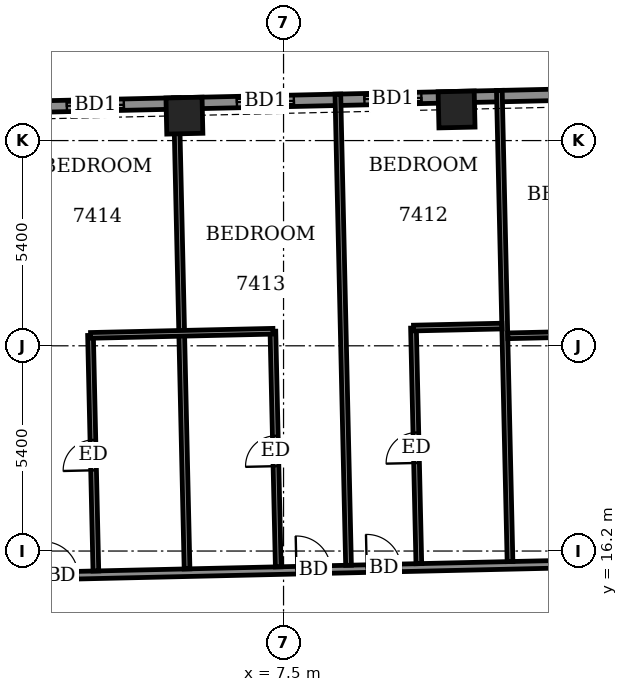
"""IFC4 building model, lengths in metres.
Left out: names, types, materials, properties, quantities, classifications, styles, units other than length and angle.
Written with IfcOpenShell. Run it as: python <this file> out.ifc"""

import sys

from ifc_helpers import new_model, si_unit, direction, frame, frame_2d, origin, origin_2d, place, context, subcontext, project, spatial, rectangle, extrude, element, fill, save


model = new_model("IFC4")
c1 = context("Model", 3, precision=1e-05, world=origin(), true_north=direction((0.0, 1.0)))
c2 = subcontext(c1, "Body", "Model", "MODEL_VIEW")
j1 = project(units=[si_unit("LENGTHUNIT", "METRE"), si_unit("PLANEANGLEUNIT", "RADIAN")], contexts=[c1])
p1 = place(None, origin())
s1 = spatial("IfcSite", under=j1, at=p1, CompositionType="ELEMENT")
p2 = place(p1, origin())
s2 = spatial("IfcBuilding", under=s1, at=p2, CompositionType="ELEMENT")
p3 = place(p2, frame((0.0, 0.0, 290.7)))
s3 = spatial("IfcBuildingStorey", under=s2, at=p3, CompositionType="ELEMENT", Elevation=290.7)
for number, where, z_axis, x_axis in (
    (1, (12.053, 27.819, -0.55), (0.0, 0.0, 1.0), (-1.0, -0.023, 0.0)),
    (2, (4.892, 27.656, -0.55), (0.0, 0.0, 1.0), (-1.0, -0.023, 0.0)),
):
    element("IfcColumn", number, at=place(p3, frame(where, z_axis=z_axis, x_axis=x_axis)), inside=s3, PredefinedType="COLUMN", context=c2, shape_type="SweptSolid", body=[
        extrude(rectangle(XDim=0.95, YDim=0.95, at=origin_2d()), origin(), (0.0, 0.0, 1.0), 3.6),
    ])
p4 = place(p3, frame((26.216, 28.465, 0.0), z_axis=(0.0, 0.0, 1.0), x_axis=(-0.999742843677, -0.022677004157, 0.0)))
e3 = element("IfcWall", 3, at=p4, inside=s3, PredefinedType="SOLIDWALL", context=c2, shape_type="SweptSolid", body=[
    extrude(rectangle(XDim=49.836, YDim=0.3, at=frame_2d((24.918, 0.0))), origin(), (0.0, 0.0, 1.0), 2.5),
])
p5 = place(p4, frame((1.763, 0.0, 0.0)))
e4 = element("IfcOpeningElement", 4, at=p5, cuts=e3, PredefinedType="OPENING", context=c2, shape_type="SweptSolid", body=[
    extrude(rectangle(XDim=1.5, YDim=2.4, at=frame_2d((0.75, 1.2))), frame((0.0, 0.16, 0.0), z_axis=(0.0, -1.0, 0.0), x_axis=(1.0, 0.0, 0.0)), (0.0, 0.0, 1.0), 0.32),
])
p6 = place(p4, frame((4.912, 0.0, 0.0)))
e5 = element("IfcOpeningElement", 5, at=p6, cuts=e3, PredefinedType="OPENING", context=c2, shape_type="SweptSolid", body=[
    extrude(rectangle(XDim=1.5, YDim=2.4, at=frame_2d((0.75, 1.2))), frame((0.0, 0.16, 0.0), z_axis=(0.0, -1.0, 0.0), x_axis=(1.0, 0.0, 0.0)), (0.0, 0.0, 1.0), 0.32),
])
p7 = place(p4, frame((10.186, 0.0, 0.0)))
e6 = element("IfcOpeningElement", 6, at=p7, cuts=e3, PredefinedType="OPENING", context=c2, shape_type="SweptSolid", body=[
    extrude(rectangle(XDim=1.5, YDim=2.4, at=frame_2d((0.75, 1.2))), frame((0.0, 0.16, 0.0), z_axis=(0.0, -1.0, 0.0), x_axis=(1.0, 0.0, 0.0)), (0.0, 0.0, 1.0), 0.32),
])
p8 = place(p4, frame((15.093, 0.0, 0.0)))
e7 = element("IfcOpeningElement", 7, at=p8, cuts=e3, PredefinedType="OPENING", context=c2, shape_type="SweptSolid", body=[
    extrude(rectangle(XDim=1.5, YDim=2.4, at=frame_2d((0.75, 1.2))), frame((0.0, 0.16, 0.0), z_axis=(0.0, -1.0, 0.0), x_axis=(1.0, 0.0, 0.0)), (0.0, 0.0, 1.0), 0.32),
])
p9 = place(p4, frame((18.449, 0.0, 0.0)))
e8 = element("IfcOpeningElement", 8, at=p9, cuts=e3, PredefinedType="OPENING", context=c2, shape_type="SweptSolid", body=[
    extrude(rectangle(XDim=1.5, YDim=2.4, at=frame_2d((0.75, 1.2))), frame((0.0, 0.16, 0.0), z_axis=(0.0, -1.0, 0.0), x_axis=(1.0, 0.0, 0.0)), (0.0, 0.0, 1.0), 0.32),
])
p10 = place(p4, frame((22.924, 0.0, 0.0)))
e9 = element("IfcOpeningElement", 9, at=p10, cuts=e3, PredefinedType="OPENING", context=c2, shape_type="SweptSolid", body=[
    extrude(rectangle(XDim=1.5, YDim=2.4, at=frame_2d((0.75, 1.2))), frame((0.0, 0.16, 0.0), z_axis=(0.0, -1.0, 0.0), x_axis=(1.0, 0.0, 0.0)), (0.0, 0.0, 1.0), 0.32),
])
p11 = place(p4, frame((26.28, 0.0, 0.0)))
e10 = element("IfcOpeningElement", 10, at=p11, cuts=e3, PredefinedType="OPENING", context=c2, shape_type="SweptSolid", body=[
    extrude(rectangle(XDim=1.5, YDim=2.4, at=frame_2d((0.75, 1.2))), frame((0.0, 0.16, 0.0), z_axis=(0.0, -1.0, 0.0), x_axis=(1.0, 0.0, 0.0)), (0.0, 0.0, 1.0), 0.32),
])
p12 = place(p4, frame((31.361, 0.0, 0.0)))
e11 = element("IfcOpeningElement", 11, at=p12, cuts=e3, PredefinedType="OPENING", context=c2, shape_type="SweptSolid", body=[
    extrude(rectangle(XDim=1.5, YDim=2.4, at=frame_2d((0.75, 1.2))), frame((0.0, 0.16, 0.0), z_axis=(0.0, -1.0, 0.0), x_axis=(1.0, 0.0, 0.0)), (0.0, 0.0, 1.0), 0.32),
])
p13 = place(p4, frame((36.437, 0.0, 0.0)))
e12 = element("IfcOpeningElement", 12, at=p13, cuts=e3, PredefinedType="OPENING", context=c2, shape_type="SweptSolid", body=[
    extrude(rectangle(XDim=1.5, YDim=2.4, at=frame_2d((0.75, 1.2))), frame((0.0, 0.16, 0.0), z_axis=(0.0, -1.0, 0.0), x_axis=(1.0, 0.0, 0.0)), (0.0, 0.0, 1.0), 0.32),
])
p14 = place(p4, frame((39.793, 0.0, 0.0)))
e13 = element("IfcOpeningElement", 13, at=p14, cuts=e3, PredefinedType="OPENING", context=c2, shape_type="SweptSolid", body=[
    extrude(rectangle(XDim=1.5, YDim=2.4, at=frame_2d((0.75, 1.2))), frame((0.0, 0.16, 0.0), z_axis=(0.0, -1.0, 0.0), x_axis=(1.0, 0.0, 0.0)), (0.0, 0.0, 1.0), 0.32),
])
p15 = place(p4, frame((44.267, 0.0, 0.0)))
e14 = element("IfcOpeningElement", 14, at=p15, cuts=e3, PredefinedType="OPENING", context=c2, shape_type="SweptSolid", body=[
    extrude(rectangle(XDim=1.5, YDim=2.4, at=frame_2d((0.75, 1.2))), frame((0.0, 0.16, 0.0), z_axis=(0.0, -1.0, 0.0), x_axis=(1.0, 0.0, 0.0)), (0.0, 0.0, 1.0), 0.32),
])
p16 = place(p4, frame((47.524, 0.0, 0.9)))
e15 = element("IfcOpeningElement", 15, at=p16, cuts=e3, PredefinedType="OPENING", context=c2, shape_type="SweptSolid", body=[
    extrude(rectangle(XDim=1.2, YDim=1.5, at=frame_2d((0.6, 0.75))), frame((0.0, 0.16, 0.0), z_axis=(0.0, -1.0, 0.0), x_axis=(1.0, 0.0, 0.0)), (0.0, 0.0, 1.0), 0.32),
])
p17 = place(p3, frame((-26.401, 14.918, 0.0), z_axis=(0.0, 0.0, 1.0), x_axis=(0.99974239733, 0.022696673341, 0.0)))
e16 = element("IfcWall", 16, at=p17, inside=s3, PredefinedType="PARTITIONING", context=c2, shape_type="SweptSolid", body=[
    extrude(rectangle(XDim=55.386, YDim=0.2, at=frame_2d((27.693, 0.0))), origin(), (0.0, 0.0, 1.0), 3.05),
])
p18 = place(p17, frame((53.718, 0.0, 0.0)))
e17 = element("IfcOpeningElement", 17, at=p18, cuts=e16, PredefinedType="OPENING", context=c2, shape_type="SweptSolid", body=[
    extrude(rectangle(XDim=1.0, YDim=2.1, at=frame_2d((0.5, 1.05))), frame((0.0, 0.11, 0.0), z_axis=(0.0, -1.0, 0.0), x_axis=(1.0, 0.0, 0.0)), (0.0, 0.0, 1.0), 0.22),
])
p19 = place(p17, frame((49.325, 0.0, 0.0)))
e18 = element("IfcOpeningElement", 18, at=p19, cuts=e16, PredefinedType="OPENING", context=c2, shape_type="SweptSolid", body=[
    extrude(rectangle(XDim=0.9, YDim=2.1, at=frame_2d((0.45, 1.05))), frame((0.0, 0.11, 0.0), z_axis=(0.0, -1.0, 0.0), x_axis=(1.0, 0.0, 0.0)), (0.0, 0.0, 1.0), 0.22),
])
p20 = place(p17, frame((44.575, 0.0, 0.0)))
e19 = element("IfcOpeningElement", 19, at=p20, cuts=e16, PredefinedType="OPENING", context=c2, shape_type="SweptSolid", body=[
    extrude(rectangle(XDim=0.9, YDim=2.1, at=frame_2d((0.45, 1.05))), frame((0.0, 0.11, 0.0), z_axis=(0.0, -1.0, 0.0), x_axis=(1.0, 0.0, 0.0)), (0.0, 0.0, 1.0), 0.22),
])
p21 = place(p17, frame((42.725, 0.0, 0.0)))
e20 = element("IfcOpeningElement", 20, at=p21, cuts=e16, PredefinedType="OPENING", context=c2, shape_type="SweptSolid", body=[
    extrude(rectangle(XDim=0.9, YDim=2.1, at=frame_2d((0.45, 1.05))), frame((0.0, 0.11, 0.0), z_axis=(0.0, -1.0, 0.0), x_axis=(1.0, 0.0, 0.0)), (0.0, 0.0, 1.0), 0.22),
])
p22 = place(p17, frame((36.1, 0.0, 0.0)))
e21 = element("IfcOpeningElement", 21, at=p22, cuts=e16, PredefinedType="OPENING", context=c2, shape_type="SweptSolid", body=[
    extrude(rectangle(XDim=0.9, YDim=2.1, at=frame_2d((0.45, 1.05))), frame((0.0, 0.11, 0.0), z_axis=(0.0, -1.0, 0.0), x_axis=(1.0, 0.0, 0.0)), (0.0, 0.0, 1.0), 0.22),
])
p23 = place(p17, frame((34.25, 0.0, 0.0)))
e22 = element("IfcOpeningElement", 22, at=p23, cuts=e16, PredefinedType="OPENING", context=c2, shape_type="SweptSolid", body=[
    extrude(rectangle(XDim=0.9, YDim=2.1, at=frame_2d((0.45, 1.05))), frame((0.0, 0.11, 0.0), z_axis=(0.0, -1.0, 0.0), x_axis=(1.0, 0.0, 0.0)), (0.0, 0.0, 1.0), 0.22),
])
p24 = place(p17, frame((27.6, 0.0, 0.0)))
e23 = element("IfcOpeningElement", 23, at=p24, cuts=e16, PredefinedType="OPENING", context=c2, shape_type="SweptSolid", body=[
    extrude(rectangle(XDim=0.9, YDim=2.1, at=frame_2d((0.45, 1.05))), frame((0.0, 0.11, 0.0), z_axis=(0.0, -1.0, 0.0), x_axis=(1.0, 0.0, 0.0)), (0.0, 0.0, 1.0), 0.22),
])
p25 = place(p17, frame((25.775, 0.0, 0.0)))
e24 = element("IfcOpeningElement", 24, at=p25, cuts=e16, PredefinedType="OPENING", context=c2, shape_type="SweptSolid", body=[
    extrude(rectangle(XDim=0.9, YDim=2.1, at=frame_2d((0.45, 1.05))), frame((0.0, 0.11, 0.0), z_axis=(0.0, -1.0, 0.0), x_axis=(1.0, 0.0, 0.0)), (0.0, 0.0, 1.0), 0.22),
])
p26 = place(p17, frame((19.15, 0.0, 0.0)))
e25 = element("IfcOpeningElement", 25, at=p26, cuts=e16, PredefinedType="OPENING", context=c2, shape_type="SweptSolid", body=[
    extrude(rectangle(XDim=0.9, YDim=2.1, at=frame_2d((0.45, 1.05))), frame((0.0, 0.11, 0.0), z_axis=(0.0, -1.0, 0.0), x_axis=(1.0, 0.0, 0.0)), (0.0, 0.0, 1.0), 0.22),
])
p27 = place(p17, frame((17.3, 0.0, 0.0)))
e26 = element("IfcOpeningElement", 26, at=p27, cuts=e16, PredefinedType="OPENING", context=c2, shape_type="SweptSolid", body=[
    extrude(rectangle(XDim=0.9, YDim=2.1, at=frame_2d((0.45, 1.05))), frame((0.0, 0.11, 0.0), z_axis=(0.0, -1.0, 0.0), x_axis=(1.0, 0.0, 0.0)), (0.0, 0.0, 1.0), 0.22),
])
p28 = place(p17, frame((10.65, 0.0, 0.0)))
e27 = element("IfcOpeningElement", 27, at=p28, cuts=e16, PredefinedType="OPENING", context=c2, shape_type="SweptSolid", body=[
    extrude(rectangle(XDim=0.9, YDim=2.1, at=frame_2d((0.45, 1.05))), frame((0.0, 0.11, 0.0), z_axis=(0.0, -1.0, 0.0), x_axis=(1.0, 0.0, 0.0)), (0.0, 0.0, 1.0), 0.22),
])
p29 = place(p17, frame((8.8, 0.0, 0.0)))
e28 = element("IfcOpeningElement", 28, at=p29, cuts=e16, PredefinedType="OPENING", context=c2, shape_type="SweptSolid", body=[
    extrude(rectangle(XDim=0.9, YDim=2.1, at=frame_2d((0.45, 1.05))), frame((0.0, 0.11, 0.0), z_axis=(0.0, -1.0, 0.0), x_axis=(1.0, 0.0, 0.0)), (0.0, 0.0, 1.0), 0.22),
])
p30 = place(p17, frame((1.864, 0.0, 0.0)))
e29 = element("IfcOpeningElement", 29, at=p30, cuts=e16, PredefinedType="OPENING", context=c2, shape_type="SweptSolid", body=[
    extrude(rectangle(XDim=1.0, YDim=2.1, at=frame_2d((0.5, 1.05))), frame((0.0, 0.11, 0.0), z_axis=(0.0, -1.0, 0.0), x_axis=(1.0, 0.0, 0.0)), (0.0, 0.0, 1.0), 0.22),
])
p31 = place(p3, frame((2.562, 15.675, 0.0), z_axis=(0.0, 0.0, 1.0), x_axis=(-0.02275807565, 0.999741001456, 0.0)))
e30 = element("IfcWall", 30, at=p31, inside=s3, PredefinedType="PARTITIONING", context=c2, shape_type="SweptSolid", body=[
    extrude(rectangle(XDim=6.201, YDim=0.15, at=frame_2d((3.1, 0.0))), origin(), (0.0, 0.0, 1.0), 3.05),
])
p32 = place(p31, frame((2.65, 0.0, 0.0)))
e31 = element("IfcOpeningElement", 31, at=p32, cuts=e30, PredefinedType="OPENING", context=c2, shape_type="SweptSolid", body=[
    extrude(rectangle(XDim=0.8, YDim=2.1, at=frame_2d((0.4, 1.05))), frame((0.0, 0.085, 0.0), z_axis=(0.0, -1.0, 0.0), x_axis=(1.0, 0.0, 0.0)), (0.0, 0.0, 1.0), 0.17),
])
p33 = place(p3, frame((4.961, 15.73, 0.0), z_axis=(0.0, 0.0, 1.0), x_axis=(-0.022661475803, 0.999743195783, 0.0)))
e32 = element("IfcWall", 32, at=p33, inside=s3, PredefinedType="PARTITIONING", context=c2, shape_type="SweptSolid", body=[
    extrude(rectangle(XDim=12.4, YDim=0.15, at=frame_2d((6.2, 0.0))), origin(), (0.0, 0.0, 1.0), 3.05),
])
p34 = place(p3, frame((7.361, 15.784, 0.0), z_axis=(0.0, 0.0, 1.0), x_axis=(-0.02275807565, 0.999741001456, 0.0)))
e33 = element("IfcWall", 33, at=p34, inside=s3, PredefinedType="PARTITIONING", context=c2, shape_type="SweptSolid", body=[
    extrude(rectangle(XDim=6.201, YDim=0.15, at=frame_2d((3.1, 0.0))), origin(), (0.0, 0.0, 1.0), 3.05),
])
p35 = place(p34, frame((2.65, 0.0, 0.0)))
e34 = element("IfcOpeningElement", 34, at=p35, cuts=e33, PredefinedType="OPENING", context=c2, shape_type="SweptSolid", body=[
    extrude(rectangle(XDim=0.8, YDim=2.1, at=frame_2d((0.4, 1.05))), frame((0.0, 0.085, 0.0), z_axis=(0.0, -1.0, 0.0), x_axis=(1.0, 0.0, 0.0)), (0.0, 0.0, 1.0), 0.17),
])
p36 = place(p3, frame((9.21, 15.826, 0.0), z_axis=(0.0, 0.0, 1.0), x_axis=(-0.022661475803, 0.999743195783, 0.0)))
e35 = element("IfcWall", 35, at=p36, inside=s3, PredefinedType="PARTITIONING", context=c2, shape_type="SweptSolid", body=[
    extrude(rectangle(XDim=12.4, YDim=0.15, at=frame_2d((6.2, 0.0))), origin(), (0.0, 0.0, 1.0), 2.5),
])
p37 = place(p3, frame((11.06, 15.868, 0.0), z_axis=(0.0, 0.0, 1.0), x_axis=(-0.02275807565, 0.999741001456, 0.0)))
e36 = element("IfcWall", 36, at=p37, inside=s3, PredefinedType="PARTITIONING", context=c2, shape_type="SweptSolid", body=[
    extrude(rectangle(XDim=6.201, YDim=0.15, at=frame_2d((3.1, 0.0))), origin(), (0.0, 0.0, 1.0), 3.05),
])
p38 = place(p37, frame((2.65, 0.0, 0.0)))
e37 = element("IfcOpeningElement", 37, at=p38, cuts=e36, PredefinedType="OPENING", context=c2, shape_type="SweptSolid", body=[
    extrude(rectangle(XDim=0.8, YDim=2.1, at=frame_2d((0.4, 1.05))), frame((0.0, 0.085, 0.0), z_axis=(0.0, -1.0, 0.0), x_axis=(1.0, 0.0, 0.0)), (0.0, 0.0, 1.0), 0.17),
])
p39 = place(p3, frame((13.459, 15.923, 0.0), z_axis=(0.0, 0.0, 1.0), x_axis=(-0.022661475803, 0.999743195783, 0.0)))
e38 = element("IfcWall", 38, at=p39, inside=s3, PredefinedType="PARTITIONING", context=c2, shape_type="SweptSolid", body=[
    extrude(rectangle(XDim=12.4, YDim=0.15, at=frame_2d((6.2, 0.0))), origin(), (0.0, 0.0, 1.0), 2.5),
])
p40 = place(p3, frame((13.401, 21.863, 0.0), z_axis=(0.0, 0.0, 1.0), x_axis=(0.99974053329, 0.022778632478, 0.0)))
e39 = element("IfcWall", 39, at=p40, inside=s3, PredefinedType="PARTITIONING", context=c2, shape_type="SweptSolid", body=[
    extrude(rectangle(XDim=2.326, YDim=0.15, at=frame_2d((1.163, 0.0))), origin(), (0.0, 0.0, 1.0), 3.05),
])
p41 = place(p3, frame((2.423, 21.874, 0.0), z_axis=(0.0, 0.0, 1.0), x_axis=(0.999742675121, 0.022684433919, 0.0)))
e40 = element("IfcWall", 40, at=p41, inside=s3, PredefinedType="PARTITIONING", context=c2, shape_type="SweptSolid", body=[
    extrude(rectangle(XDim=4.8, YDim=0.15, at=frame_2d((2.4, 0.0))), origin(), (0.0, 0.0, 1.0), 3.05),
])
p42 = place(p3, frame((10.921, 22.067, 0.0), z_axis=(0.0, 0.0, 1.0), x_axis=(0.999750007167, 0.022358961731, 0.0)))
e41 = element("IfcWall", 41, at=p42, inside=s3, PredefinedType="PARTITIONING", context=c2, shape_type="SweptSolid", body=[
    extrude(rectangle(XDim=2.326, YDim=0.15, at=frame_2d((1.163, 0.0))), origin(), (0.0, 0.0, 1.0), 3.05),
])
p43 = place(p8, origin())
e42 = element("IfcDoor", 42, at=p43, inside=s3, OperationType="SLIDING_TO_LEFT", PredefinedType="DOOR", context=c2, shape_type="SweptSolid", body=[
    extrude(rectangle(XDim=1.5, YDim=2.4, at=frame_2d((0.75, 1.2))), frame((0.0, 0.025, 0.0), z_axis=(0.0, -1.0, 0.0), x_axis=(1.0, 0.0, 0.0)), (0.0, 0.0, 1.0), 0.05),
])
fill(e7, e42)
p44 = place(p9, origin())
e43 = element("IfcDoor", 43, at=p44, inside=s3, OperationType="SLIDING_TO_LEFT", PredefinedType="DOOR", context=c2, shape_type="SweptSolid", body=[
    extrude(rectangle(XDim=1.5, YDim=2.4, at=frame_2d((0.75, 1.2))), frame((0.0, 0.025, 0.0), z_axis=(0.0, -1.0, 0.0), x_axis=(1.0, 0.0, 0.0)), (0.0, 0.0, 1.0), 0.05),
])
fill(e8, e43)
p45 = place(p10, origin())
e44 = element("IfcDoor", 44, at=p45, inside=s3, OperationType="SLIDING_TO_LEFT", PredefinedType="DOOR", context=c2, shape_type="SweptSolid", body=[
    extrude(rectangle(XDim=1.5, YDim=2.4, at=frame_2d((0.75, 1.2))), frame((0.0, 0.025, 0.0), z_axis=(0.0, -1.0, 0.0), x_axis=(1.0, 0.0, 0.0)), (0.0, 0.0, 1.0), 0.05),
])
fill(e9, e44)
p46 = place(p22, origin())
e45 = element("IfcDoor", 45, at=p46, inside=s3, OperationType="SINGLE_SWING_RIGHT", PredefinedType="DOOR", context=c2, shape_type="SweptSolid", body=[
    extrude(rectangle(XDim=0.9, YDim=2.1, at=frame_2d((0.45, 1.05))), frame((0.0, 0.025, 0.0), z_axis=(0.0, -1.0, 0.0), x_axis=(1.0, 0.0, 0.0)), (0.0, 0.0, 1.0), 0.05),
])
fill(e21, e45)
p47 = place(p38, origin())
e46 = element("IfcDoor", 46, at=p47, inside=s3, OperationType="SINGLE_SWING_RIGHT", PredefinedType="DOOR", context=c2, shape_type="SweptSolid", body=[
    extrude(rectangle(XDim=0.8, YDim=2.1, at=frame_2d((0.4, 1.05))), frame((0.0, 0.025, 0.0), z_axis=(0.0, -1.0, 0.0), x_axis=(1.0, 0.0, 0.0)), (0.0, 0.0, 1.0), 0.05),
])
fill(e37, e46)
p48 = place(p23, origin())
e47 = element("IfcDoor", 47, at=p48, inside=s3, OperationType="SINGLE_SWING_LEFT", PredefinedType="DOOR", context=c2, shape_type="SweptSolid", body=[
    extrude(rectangle(XDim=0.9, YDim=2.1, at=frame_2d((0.45, 1.05))), frame((0.0, 0.025, 0.0), z_axis=(0.0, -1.0, 0.0), x_axis=(1.0, 0.0, 0.0)), (0.0, 0.0, 1.0), 0.05),
])
fill(e22, e47)
p49 = place(p35, origin())
e48 = element("IfcDoor", 48, at=p49, inside=s3, OperationType="SINGLE_SWING_LEFT", PredefinedType="DOOR", context=c2, shape_type="SweptSolid", body=[
    extrude(rectangle(XDim=0.8, YDim=2.1, at=frame_2d((0.4, 1.05))), frame((0.0, 0.025, 0.0), z_axis=(0.0, -1.0, 0.0), x_axis=(1.0, 0.0, 0.0)), (0.0, 0.0, 1.0), 0.05),
])
fill(e34, e48)
p50 = place(p24, origin())
e49 = element("IfcDoor", 49, at=p50, inside=s3, OperationType="SINGLE_SWING_RIGHT", PredefinedType="DOOR", context=c2, shape_type="SweptSolid", body=[
    extrude(rectangle(XDim=0.9, YDim=2.1, at=frame_2d((0.45, 1.05))), frame((0.0, 0.025, 0.0), z_axis=(0.0, -1.0, 0.0), x_axis=(1.0, 0.0, 0.0)), (0.0, 0.0, 1.0), 0.05),
])
fill(e23, e49)
p51 = place(p32, origin())
e50 = element("IfcDoor", 50, at=p51, inside=s3, OperationType="SINGLE_SWING_RIGHT", PredefinedType="DOOR", context=c2, shape_type="SweptSolid", body=[
    extrude(rectangle(XDim=0.8, YDim=2.1, at=frame_2d((0.4, 1.05))), frame((0.0, 0.025, 0.0), z_axis=(0.0, -1.0, 0.0), x_axis=(1.0, 0.0, 0.0)), (0.0, 0.0, 1.0), 0.05),
])
fill(e31, e50)
save(model, sys.argv[1])
